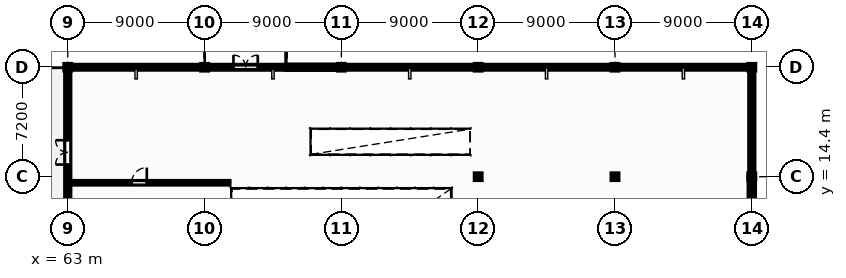
"""IFC4 building model, lengths in metres.
Left out: names, types, materials, properties, quantities, classifications, styles, units other than length and angle.
Written with IfcOpenShell. Run it as: python <this file> out.ifc"""

import sys

from ifc_helpers import new_model, si_unit, direction, frame, frame_2d, origin, origin_2d, place, context, subcontext, project, spatial, polyline, rectangle, i_section, outline, extrude, element, fill, save


model = new_model("IFC4")
c1 = context("Model", 3, precision=1e-05, world=origin(), true_north=direction((0.0, 1.0)))
c2 = subcontext(c1, "Body", "Model", "MODEL_VIEW")
j1 = project(units=[si_unit("LENGTHUNIT", "METRE"), si_unit("PLANEANGLEUNIT", "RADIAN")], contexts=[c1])
p1 = place(None, origin())
s1 = spatial("IfcSite", under=j1, at=p1, CompositionType="ELEMENT")
p2 = place(p1, origin())
s2 = spatial("IfcBuilding", under=s1, at=p2, CompositionType="ELEMENT")
p3 = place(p2, frame((0.0, 0.0, 5.1)))
s3 = spatial("IfcBuildingStorey", under=s2, at=p3, CompositionType="ELEMENT", Elevation=5.1)
for number, where, z_axis, x_axis in (
    (1, (63.0, 21.6, 0.0), (0.0, 0.0, 1.0), (1.0, 0.0, 0.0)),
    (2, (72.0, 21.6, 0.0), (0.0, 0.0, 1.0), (1.0, 0.0, 0.0)),
    (3, (81.0, 21.6, 0.0), (0.0, 0.0, 1.0), (1.0, 0.0, 0.0)),
    (4, (90.0, 14.4, 0.0), (0.0, 0.0, 1.0), (1.0, 0.0, 0.0)),
    (5, (90.0, 21.6, 0.0), (0.0, 0.0, 1.0), (1.0, 0.0, 0.0)),
    (6, (99.0, 14.4, 0.0), (0.0, 0.0, 1.0), (1.0, 0.0, 0.0)),
    (7, (99.0, 21.6, 0.0), (0.0, 0.0, 1.0), (1.0, 0.0, 0.0)),
    (8, (108.0, 14.4, 0.0), (0.0, 0.0, 1.0), (1.0, 0.0, 0.0)),
    (9, (108.0, 21.6, 0.0), (0.0, 0.0, 1.0), (1.0, 0.0, 0.0)),
):
    element("IfcColumn", number, at=place(p3, frame(where, z_axis=z_axis, x_axis=x_axis)), inside=s3, PredefinedType="COLUMN", context=c2, shape_type="SweptSolid", body=[
        extrude(i_section(OverallWidth=0.368, OverallDepth=0.356, WebThickness=0.011, FlangeThickness=0.018, at=origin_2d()), origin(), (0.0, 0.0, 1.0), 3.84),
    ])
p4 = place(p3, frame((63.0, 21.6, 3.55), z_axis=(0.0, 0.0, 1.0), x_axis=(1.0, 0.0, 0.0)))
e10 = element("IfcWall", 10, at=p4, inside=s3, PredefinedType="SOLIDWALL", context=c2, shape_type="SweptSolid", body=[
    extrude(rectangle(XDim=45.0, YDim=0.24, at=frame_2d((22.5, 0.0))), origin(), (0.0, 0.0, 1.0), 2.781),
])
p5 = place(p4, frame((3.0, 0.0, 0.45)))
e11 = element("IfcOpeningElement", 11, at=p5, cuts=e10, PredefinedType="OPENING", context=c2, shape_type="SweptSolid", body=[
    extrude(rectangle(XDim=2.4, YDim=1.1, at=frame_2d((1.2, 0.55))), frame((0.0, 0.13, 0.0), z_axis=(0.0, -1.0, 0.0), x_axis=(1.0, 0.0, 0.0)), (0.0, 0.0, 1.0), 0.26),
])
p6 = place(p4, frame((11.2, 0.0, 0.45)))
e12 = element("IfcOpeningElement", 12, at=p6, cuts=e10, PredefinedType="OPENING", context=c2, shape_type="SweptSolid", body=[
    extrude(rectangle(XDim=2.4, YDim=1.1, at=frame_2d((1.2, 0.55))), frame((0.0, 0.13, 0.0), z_axis=(0.0, -1.0, 0.0), x_axis=(1.0, 0.0, 0.0)), (0.0, 0.0, 1.0), 0.26),
])
p7 = place(p4, frame((23.65, 0.0, 0.45)))
e13 = element("IfcOpeningElement", 13, at=p7, cuts=e10, PredefinedType="OPENING", context=c2, shape_type="SweptSolid", body=[
    extrude(rectangle(XDim=2.4, YDim=1.1, at=frame_2d((1.2, 0.55))), frame((0.0, 0.13, 0.0), z_axis=(0.0, -1.0, 0.0), x_axis=(1.0, 0.0, 0.0)), (0.0, 0.0, 1.0), 0.26),
])
p8 = place(p4, frame((37.35, 0.0, 0.45)))
e14 = element("IfcOpeningElement", 14, at=p8, cuts=e10, PredefinedType="OPENING", context=c2, shape_type="SweptSolid", body=[
    extrude(rectangle(XDim=2.4, YDim=1.1, at=frame_2d((1.2, 0.55))), frame((0.0, 0.13, 0.0), z_axis=(0.0, -1.0, 0.0), x_axis=(1.0, 0.0, 0.0)), (0.0, 0.0, 1.0), 0.26),
])
p9 = place(p3, frame((63.0, 0.0, 0.0), z_axis=(0.0, 0.0, 1.0), x_axis=(0.0, 1.0, 0.0)))
e15 = element("IfcWall", 15, at=p9, inside=s3, PredefinedType="SOLIDWALL", context=c2, shape_type="SweptSolid", body=[
    extrude(outline(polyline([(0.0, 0.0), (21.6, 0.0), (21.6, 7.297), (10.8, 4.2), (0.0, 7.297), (0.0, 0.0)])), frame((0.0, 0.13, 0.0), z_axis=(0.0, -1.0, 0.0), x_axis=(1.0, 0.0, 0.0)), (0.0, 0.0, 1.0), 0.26),
])
p10 = place(p9, frame((15.2, 0.0, 0.0)))
e16 = element("IfcOpeningElement", 16, at=p10, cuts=e15, PredefinedType="OPENING", context=c2, shape_type="SweptSolid", body=[
    extrude(rectangle(XDim=1.6, YDim=2.25, at=frame_2d((0.8, 1.125))), frame((0.0, 0.14, 0.0), z_axis=(0.0, -1.0, 0.0), x_axis=(1.0, 0.0, 0.0)), (0.0, 0.0, 1.0), 0.28),
])
p11 = place(p9, frame((4.2, 0.0, 0.85)))
e17 = element("IfcOpeningElement", 17, at=p11, cuts=e15, PredefinedType="OPENING", context=c2, shape_type="SweptSolid", body=[
    extrude(rectangle(XDim=2.2, YDim=1.95, at=frame_2d((1.1, 0.975))), frame((0.0, 0.14, 0.0), z_axis=(0.0, -1.0, 0.0), x_axis=(1.0, 0.0, 0.0)), (0.0, 0.0, 1.0), 0.28),
])
p12 = place(p3, frame((108.0, 0.0, 0.0), z_axis=(0.0, 0.0, 1.0), x_axis=(0.0, 1.0, 0.0)))
e18 = element("IfcWall", 18, at=p12, inside=s3, PredefinedType="SOLIDWALL", context=c2, shape_type="SweptSolid", body=[
    extrude(rectangle(XDim=14.4, YDim=0.34, at=frame_2d((7.2, 0.0))), origin(), (0.0, 0.0, 1.0), 3.55),
])
p13 = place(p12, frame((4.5, 0.0, 0.85)))
e19 = element("IfcOpeningElement", 19, at=p13, cuts=e18, PredefinedType="OPENING", context=c2, shape_type="SweptSolid", body=[
    extrude(rectangle(XDim=2.2, YDim=1.95, at=frame_2d((1.1, 0.975))), frame((0.0, 0.18, 0.0), z_axis=(0.0, -1.0, 0.0), x_axis=(1.0, 0.0, 0.0)), (0.0, 0.0, 1.0), 0.36),
])
p14 = place(p3, frame((108.0, 14.4, 0.0), z_axis=(0.0, 0.0, 1.0), x_axis=(0.0, 1.0, 0.0)))
e20 = element("IfcWall", 20, at=p14, inside=s3, PredefinedType="SOLIDWALL", context=c2, shape_type="SweptSolid", body=[
    extrude(outline(polyline([(0.0, 0.0), (7.2, 0.0), (7.2, 7.297), (0.0, 5.232), (0.0, 0.0)])), frame((0.0, 0.13, 0.0), z_axis=(0.0, -1.0, 0.0), x_axis=(1.0, 0.0, 0.0)), (0.0, 0.0, 1.0), 0.26),
])
p15 = place(p14, frame((2.2, 0.0, 0.85)))
e21 = element("IfcOpeningElement", 21, at=p15, cuts=e20, PredefinedType="OPENING", context=c2, shape_type="SweptSolid", body=[
    extrude(rectangle(XDim=1.4, YDim=1.8, at=frame_2d((0.7, 0.9))), frame((0.0, 0.14, 0.0), z_axis=(0.0, -1.0, 0.0), x_axis=(1.0, 0.0, 0.0)), (0.0, 0.0, 1.0), 0.28),
])
p16 = place(p3, frame((77.4, 21.6, 0.0), z_axis=(0.0, 0.0, 1.0), x_axis=(1.0, 0.0, 0.0)))
e22 = element("IfcWall", 22, at=p16, inside=s3, PredefinedType="SOLIDWALL", context=c2, shape_type="SweptSolid", body=[
    extrude(rectangle(XDim=3.6, YDim=0.26, at=frame_2d((1.8, 0.0))), origin(), (0.0, 0.0, 1.0), 2.974),
])
p17 = place(p3, frame((63.0, 14.0, 0.0), z_axis=(0.0, 0.0, 1.0), x_axis=(1.0, 0.0, 0.0)))
e23 = element("IfcWall", 23, at=p17, inside=s3, PredefinedType="PARTITIONING", context=c2, shape_type="SweptSolid", body=[
    extrude(rectangle(XDim=10.6, YDim=0.16, at=frame_2d((5.3, 0.0))), origin(), (0.0, 0.0, 1.0), 3.55),
])
p18 = place(p17, frame((4.2, 0.0, 0.0)))
e24 = element("IfcOpeningElement", 24, at=p18, cuts=e23, PredefinedType="OPENING", context=c2, shape_type="SweptSolid", body=[
    extrude(rectangle(XDim=1.0, YDim=2.15, at=frame_2d((0.5, 1.075))), frame((0.0, 0.09, 0.0), z_axis=(0.0, -1.0, 0.0), x_axis=(1.0, 0.0, 0.0)), (0.0, 0.0, 1.0), 0.18),
])
p19 = place(p3, frame((72.0, 21.6, 0.0), z_axis=(0.0, 0.0, 1.0), x_axis=(1.0, 0.0, 0.0)))
e25 = element("IfcWall", 25, at=p19, inside=s3, PredefinedType="PARTITIONING", context=c2, shape_type="SweptSolid", body=[
    extrude(rectangle(XDim=5.4, YDim=0.16, at=frame_2d((2.7, 0.0))), origin(), (0.0, 0.0, 1.0), 2.974),
])
p20 = place(p19, frame((1.9, 0.0, 0.0)))
e26 = element("IfcOpeningElement", 26, at=p20, cuts=e25, PredefinedType="OPENING", context=c2, shape_type="SweptSolid", body=[
    extrude(rectangle(XDim=1.6, YDim=2.2, at=frame_2d((0.8, 1.1))), frame((0.0, 0.09, 0.0), z_axis=(0.0, -1.0, 0.0), x_axis=(1.0, 0.0, 0.0)), (0.0, 0.0, 1.0), 0.18),
])
p21 = place(p5, origin())
e27 = element("IfcWindow", 27, at=p21, inside=s3, PartitioningType="SINGLE_PANEL", PredefinedType="WINDOW", context=c2, shape_type="SweptSolid", body=[
    extrude(rectangle(XDim=2.4, YDim=1.1, at=frame_2d((1.2, 0.55))), frame((0.0, 0.03, 0.0), z_axis=(0.0, -1.0, 0.0), x_axis=(1.0, 0.0, 0.0)), (0.0, 0.0, 1.0), 0.06),
])
fill(e11, e27)
p22 = place(p6, origin())
e28 = element("IfcWindow", 28, at=p22, inside=s3, PartitioningType="SINGLE_PANEL", PredefinedType="WINDOW", context=c2, shape_type="SweptSolid", body=[
    extrude(rectangle(XDim=2.4, YDim=1.1, at=frame_2d((1.2, 0.55))), frame((0.0, 0.03, 0.0), z_axis=(0.0, -1.0, 0.0), x_axis=(1.0, 0.0, 0.0)), (0.0, 0.0, 1.0), 0.06),
])
fill(e12, e28)
p23 = place(p7, origin())
e29 = element("IfcWindow", 29, at=p23, inside=s3, PartitioningType="SINGLE_PANEL", PredefinedType="WINDOW", context=c2, shape_type="SweptSolid", body=[
    extrude(rectangle(XDim=2.4, YDim=1.1, at=frame_2d((1.2, 0.55))), frame((0.0, 0.03, 0.0), z_axis=(0.0, -1.0, 0.0), x_axis=(1.0, 0.0, 0.0)), (0.0, 0.0, 1.0), 0.06),
])
fill(e13, e29)
p24 = place(p8, origin())
e30 = element("IfcWindow", 30, at=p24, inside=s3, PartitioningType="SINGLE_PANEL", PredefinedType="WINDOW", context=c2, shape_type="SweptSolid", body=[
    extrude(rectangle(XDim=2.4, YDim=1.1, at=frame_2d((1.2, 0.55))), frame((0.0, 0.03, 0.0), z_axis=(0.0, -1.0, 0.0), x_axis=(1.0, 0.0, 0.0)), (0.0, 0.0, 1.0), 0.06),
])
fill(e14, e30)
p25 = place(p10, origin())
e31 = element("IfcDoor", 31, at=p25, inside=s3, OperationType="DOUBLE_DOOR_SINGLE_SWING", PredefinedType="DOOR", context=c2, shape_type="SweptSolid", body=[
    extrude(rectangle(XDim=1.6, YDim=2.25, at=frame_2d((0.8, 1.125))), frame((0.0, 0.025, 0.0), z_axis=(0.0, -1.0, 0.0), x_axis=(1.0, 0.0, 0.0)), (0.0, 0.0, 1.0), 0.05),
])
fill(e16, e31)
p26 = place(p15, origin())
e32 = element("IfcWindow", 32, at=p26, inside=s3, PartitioningType="SINGLE_PANEL", PredefinedType="WINDOW", context=c2, shape_type="SweptSolid", body=[
    extrude(rectangle(XDim=1.4, YDim=1.8, at=frame_2d((0.7, 0.9))), frame((0.0, 0.03, 0.0), z_axis=(0.0, -1.0, 0.0), x_axis=(1.0, 0.0, 0.0)), (0.0, 0.0, 1.0), 0.06),
])
fill(e21, e32)
p27 = place(p18, origin())
e33 = element("IfcDoor", 33, at=p27, inside=s3, OperationType="SINGLE_SWING_RIGHT", PredefinedType="DOOR", context=c2, shape_type="SweptSolid", body=[
    extrude(rectangle(XDim=1.0, YDim=2.15, at=frame_2d((0.5, 1.075))), frame((0.0, 0.025, 0.0), z_axis=(0.0, -1.0, 0.0), x_axis=(1.0, 0.0, 0.0)), (0.0, 0.0, 1.0), 0.05),
])
fill(e24, e33)
p28 = place(p20, origin())
e34 = element("IfcDoor", 34, at=p28, inside=s3, OperationType="DOUBLE_DOOR_SINGLE_SWING", PredefinedType="DOOR", context=c2, shape_type="SweptSolid", body=[
    extrude(rectangle(XDim=1.6, YDim=2.2, at=frame_2d((0.8, 1.1))), frame((0.0, 0.025, 0.0), z_axis=(0.0, -1.0, 0.0), x_axis=(1.0, 0.0, 0.0)), (0.0, 0.0, 1.0), 0.05),
])
fill(e26, e34)
save(model, sys.argv[1])
